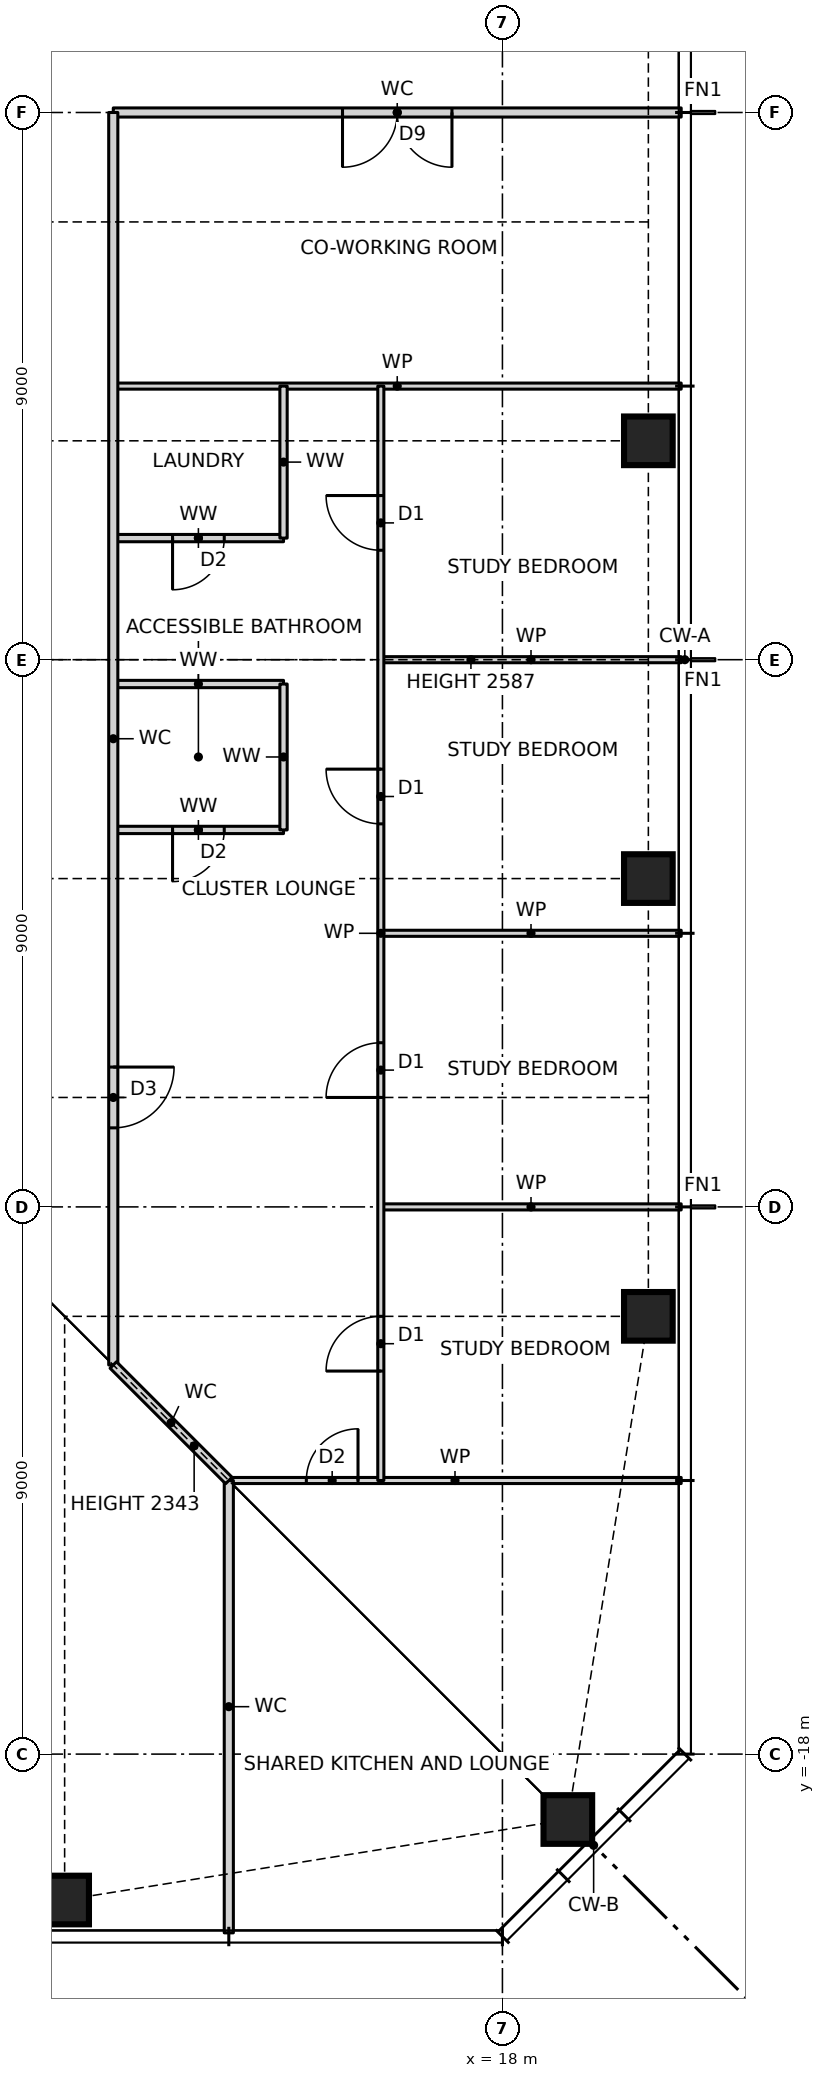
"""IFC4 building model, lengths in metres.
Left out: names, types, materials, properties, quantities, classifications, styles, units other than length and angle.
Written with IfcOpenShell. Run it as: python <this file> out.ifc"""

import sys

from ifc_helpers import new_model, si_unit, direction, frame, frame_2d, origin, origin_2d, place, context, subcontext, project, spatial, rectangle, hollow_rectangle, extrude, element, fill, save


model = new_model("IFC4")
c1 = context("Model", 3, precision=1e-05, world=origin(), true_north=direction((0.0, 1.0)))
c2 = subcontext(c1, "Body", "Model", "MODEL_VIEW")
j1 = project(units=[si_unit("LENGTHUNIT", "METRE"), si_unit("PLANEANGLEUNIT", "RADIAN")], contexts=[c1])
p1 = place(None, origin())
s1 = spatial("IfcSite", under=j1, at=p1, CompositionType="ELEMENT")
p2 = place(p1, origin())
s2 = spatial("IfcBuilding", under=s1, at=p2, CompositionType="ELEMENT")
p3 = place(p2, frame((0.0, 0.0, 119.0)))
s3 = spatial("IfcBuildingStorey", under=s2, at=p3, CompositionType="ELEMENT", Elevation=119.0)
for number, where, z_axis, x_axis in (
    (1, (10.8, -20.4, 0.0), (0.0, 0.0, 1.0), (1.0, 0.0, 0.0)),
    (2, (19.076, -19.076, 0.0), (0.0, 0.0, 1.0), (1.0, 0.0, 0.0)),
    (3, (20.4, -10.8, 0.0), (0.0, 0.0, 1.0), (1.0, 0.0, 0.0)),
    (4, (20.4, -3.6, 0.0), (0.0, 0.0, 1.0), (1.0, 0.0, 0.0)),
    (5, (20.4, 3.6, 0.0), (0.0, 0.0, 1.0), (1.0, 0.0, 0.0)),
):
    element("IfcColumn", number, at=place(p3, frame(where, z_axis=z_axis, x_axis=x_axis)), inside=s3, PredefinedType="COLUMN", context=c2, shape_type="SweptSolid", body=[
        extrude(hollow_rectangle(XDim=0.8, YDim=0.8, WallThickness=0.07, at=origin_2d()), origin(), (0.0, 0.0, 1.0), 3.5),
    ])
p4 = place(p3, frame((13.5, -13.5, 0.0), z_axis=(0.0, 0.0, 1.0), x_axis=(1.0, 0.0, 0.0)))
e6 = element("IfcWall", 6, at=p4, inside=s3, PredefinedType="PARTITIONING", context=c2, shape_type="SweptSolid", body=[
    extrude(rectangle(XDim=7.44, YDim=0.1, at=frame_2d((3.72, 0.0))), origin(), (0.0, 0.0, 1.0), 3.27),
])
p5 = place(p4, frame((1.275, 0.0, 0.0)))
e7 = element("IfcOpeningElement", 7, at=p5, cuts=e6, PredefinedType="OPENING", context=c2, shape_type="SweptSolid", body=[
    extrude(rectangle(XDim=0.85, YDim=2.1, at=frame_2d((0.425, 1.05))), frame((0.0, 0.06, 0.0), z_axis=(0.0, -1.0, 0.0), x_axis=(1.0, 0.0, 0.0)), (0.0, 0.0, 1.0), 0.12),
])
for number, where, z_axis, x_axis in (
    (8, (16.0, -9.0, 0.0), (0.0, 0.0, 1.0), (1.0, 0.0, 0.0)),
    (9, (16.0, -4.5, 0.0), (0.0, 0.0, 1.0), (1.0, 0.0, 0.0)),
):
    element("IfcWall", number, at=place(p3, frame(where, z_axis=z_axis, x_axis=x_axis)), inside=s3, PredefinedType="PARTITIONING", context=c2, shape_type="SweptSolid", body=[
        extrude(rectangle(XDim=4.94, YDim=0.1, at=frame_2d((2.47, 0.0))), origin(), (0.0, 0.0, 1.0), 3.27),
    ])
p6 = place(p3, frame((11.6, -2.8, 0.0), z_axis=(0.0, 0.0, 1.0), x_axis=(1.0, 0.0, 0.0)))
e10 = element("IfcWall", 10, at=p6, inside=s3, PredefinedType="PARTITIONING", context=c2, shape_type="SweptSolid", body=[
    extrude(rectangle(XDim=2.8, YDim=0.12, at=frame_2d((1.4, 0.0))), origin(), (0.0, 0.0, 1.0), 3.27),
])
p7 = place(p6, frame((0.975, 0.0, 0.0)))
e11 = element("IfcOpeningElement", 11, at=p7, cuts=e10, PredefinedType="OPENING", context=c2, shape_type="SweptSolid", body=[
    extrude(rectangle(XDim=0.85, YDim=2.1, at=frame_2d((0.425, 1.05))), frame((0.0, 0.07, 0.0), z_axis=(0.0, -1.0, 0.0), x_axis=(1.0, 0.0, 0.0)), (0.0, 0.0, 1.0), 0.14),
])
p8 = place(p3, frame((11.6, -0.4, 0.0), z_axis=(0.0, 0.0, 1.0), x_axis=(1.0, 0.0, 0.0)))
e12 = element("IfcWall", 12, at=p8, inside=s3, PredefinedType="PARTITIONING", context=c2, shape_type="SweptSolid", body=[
    extrude(rectangle(XDim=2.8, YDim=0.12, at=frame_2d((1.4, 0.0))), origin(), (0.0, 0.0, 1.0), 3.27),
])
p9 = place(p3, frame((16.0, 0.0, 0.0), z_axis=(0.0, 0.0, 1.0), x_axis=(1.0, 0.0, 0.0)))
e13 = element("IfcWall", 13, at=p9, inside=s3, PredefinedType="PARTITIONING", context=c2, shape_type="SweptSolid", body=[
    extrude(rectangle(XDim=4.94, YDim=0.1, at=frame_2d((2.47, 0.0))), origin(), (0.0, 0.0, 1.0), 2.587),
])
p10 = place(p3, frame((11.6, 2.0, 0.0), z_axis=(0.0, 0.0, 1.0), x_axis=(1.0, 0.0, 0.0)))
e14 = element("IfcWall", 14, at=p10, inside=s3, PredefinedType="PARTITIONING", context=c2, shape_type="SweptSolid", body=[
    extrude(rectangle(XDim=2.8, YDim=0.12, at=frame_2d((1.4, 0.0))), origin(), (0.0, 0.0, 1.0), 3.27),
])
p11 = place(p10, frame((0.975, 0.0, 0.0)))
e15 = element("IfcOpeningElement", 15, at=p11, cuts=e14, PredefinedType="OPENING", context=c2, shape_type="SweptSolid", body=[
    extrude(rectangle(XDim=0.85, YDim=2.1, at=frame_2d((0.425, 1.05))), frame((0.0, 0.07, 0.0), z_axis=(0.0, -1.0, 0.0), x_axis=(1.0, 0.0, 0.0)), (0.0, 0.0, 1.0), 0.14),
])
p12 = place(p3, frame((11.6, 4.5, 0.0), z_axis=(0.0, 0.0, 1.0), x_axis=(1.0, 0.0, 0.0)))
e16 = element("IfcWall", 16, at=p12, inside=s3, PredefinedType="PARTITIONING", context=c2, shape_type="SweptSolid", body=[
    extrude(rectangle(XDim=9.34, YDim=0.1, at=frame_2d((4.67, 0.0))), origin(), (0.0, 0.0, 1.0), 3.27),
])
p13 = place(p3, frame((11.6, 9.0, 0.0), z_axis=(0.0, 0.0, 1.0), x_axis=(1.0, 0.0, 0.0)))
e17 = element("IfcWall", 17, at=p13, inside=s3, PredefinedType="PARTITIONING", context=c2, shape_type="SweptSolid", body=[
    extrude(rectangle(XDim=9.34, YDim=0.15, at=frame_2d((4.67, 0.0))), origin(), (0.0, 0.0, 1.0), 3.27),
])
p14 = place(p13, frame((3.77, 0.0, 0.0)))
e18 = element("IfcOpeningElement", 18, at=p14, cuts=e17, PredefinedType="OPENING", context=c2, shape_type="SweptSolid", body=[
    extrude(rectangle(XDim=1.8, YDim=2.1, at=frame_2d((0.9, 1.05))), frame((0.0, 0.085, 0.0), z_axis=(0.0, -1.0, 0.0), x_axis=(1.0, 0.0, 0.0)), (0.0, 0.0, 1.0), 0.17),
])
p15 = place(p3, frame((16.0, -13.5, 0.0), z_axis=(0.0, 0.0, 1.0), x_axis=(0.0, 1.0, 0.0)))
e19 = element("IfcWall", 19, at=p15, inside=s3, PredefinedType="PARTITIONING", context=c2, shape_type="SweptSolid", body=[
    extrude(rectangle(XDim=18.0, YDim=0.1, at=frame_2d((9.0, 0.0))), origin(), (0.0, 0.0, 1.0), 3.27),
])
p16 = place(p15, frame((1.8, 0.0, 0.0)))
e20 = element("IfcOpeningElement", 20, at=p16, cuts=e19, PredefinedType="OPENING", context=c2, shape_type="SweptSolid", body=[
    extrude(rectangle(XDim=0.9, YDim=2.1, at=frame_2d((0.45, 1.05))), frame((0.0, 0.06, 0.0), z_axis=(0.0, -1.0, 0.0), x_axis=(1.0, 0.0, 0.0)), (0.0, 0.0, 1.0), 0.12),
])
p17 = place(p15, frame((6.3, 0.0, 0.0)))
e21 = element("IfcOpeningElement", 21, at=p17, cuts=e19, PredefinedType="OPENING", context=c2, shape_type="SweptSolid", body=[
    extrude(rectangle(XDim=0.9, YDim=2.1, at=frame_2d((0.45, 1.05))), frame((0.0, 0.06, 0.0), z_axis=(0.0, -1.0, 0.0), x_axis=(1.0, 0.0, 0.0)), (0.0, 0.0, 1.0), 0.12),
])
p18 = place(p15, frame((10.8, 0.0, 0.0)))
e22 = element("IfcOpeningElement", 22, at=p18, cuts=e19, PredefinedType="OPENING", context=c2, shape_type="SweptSolid", body=[
    extrude(rectangle(XDim=0.9, YDim=2.1, at=frame_2d((0.45, 1.05))), frame((0.0, 0.06, 0.0), z_axis=(0.0, -1.0, 0.0), x_axis=(1.0, 0.0, 0.0)), (0.0, 0.0, 1.0), 0.12),
])
p19 = place(p15, frame((15.3, 0.0, 0.0)))
e23 = element("IfcOpeningElement", 23, at=p19, cuts=e19, PredefinedType="OPENING", context=c2, shape_type="SweptSolid", body=[
    extrude(rectangle(XDim=0.9, YDim=2.1, at=frame_2d((0.45, 1.05))), frame((0.0, 0.06, 0.0), z_axis=(0.0, -1.0, 0.0), x_axis=(1.0, 0.0, 0.0)), (0.0, 0.0, 1.0), 0.12),
])
p20 = place(p3, frame((14.4, -2.8, 0.0), z_axis=(0.0, 0.0, 1.0), x_axis=(0.0, 1.0, 0.0)))
e24 = element("IfcWall", 24, at=p20, inside=s3, PredefinedType="PARTITIONING", context=c2, shape_type="SweptSolid", body=[
    extrude(rectangle(XDim=2.4, YDim=0.12, at=frame_2d((1.2, 0.0))), origin(), (0.0, 0.0, 1.0), 3.27),
])
p21 = place(p3, frame((14.4, 2.0, 0.0), z_axis=(0.0, 0.0, 1.0), x_axis=(0.0, 1.0, 0.0)))
e25 = element("IfcWall", 25, at=p21, inside=s3, PredefinedType="PARTITIONING", context=c2, shape_type="SweptSolid", body=[
    extrude(rectangle(XDim=2.5, YDim=0.12, at=frame_2d((1.25, 0.0))), origin(), (0.0, 0.0, 1.0), 3.27),
])
p22 = place(p3, frame((13.5, -20.94, 0.0), z_axis=(0.0, 0.0, 1.0), x_axis=(0.0, 1.0, 0.0)))
e26 = element("IfcWall", 26, at=p22, inside=s3, PredefinedType="PARTITIONING", context=c2, shape_type="SweptSolid", body=[
    extrude(rectangle(XDim=7.44, YDim=0.15, at=frame_2d((3.72, 0.0))), origin(), (0.0, 0.0, 1.0), 3.27),
])
p23 = place(p3, frame((11.6, -11.6, 0.0), z_axis=(0.0, 0.0, 1.0), x_axis=(0.0, 1.0, 0.0)))
e27 = element("IfcWall", 27, at=p23, inside=s3, PredefinedType="PARTITIONING", context=c2, shape_type="SweptSolid", body=[
    extrude(rectangle(XDim=20.6, YDim=0.15, at=frame_2d((10.3, 0.0))), origin(), (0.0, 0.0, 1.0), 3.27),
])
p24 = place(p23, frame((3.9, 0.0, 0.0)))
e28 = element("IfcOpeningElement", 28, at=p24, cuts=e27, PredefinedType="OPENING", context=c2, shape_type="SweptSolid", body=[
    extrude(rectangle(XDim=1.0, YDim=2.1, at=frame_2d((0.5, 1.05))), frame((0.0, 0.085, 0.0), z_axis=(0.0, -1.0, 0.0), x_axis=(1.0, 0.0, 0.0)), (0.0, 0.0, 1.0), 0.17),
])
p25 = place(p3, frame((13.5, -13.5, 0.0), z_axis=(0.0, 0.0, 1.0), x_axis=(-0.707106781187, 0.707106781187, 0.0)))
e29 = element("IfcWall", 29, at=p25, inside=s3, PredefinedType="PARTITIONING", context=c2, shape_type="SweptSolid", body=[
    extrude(rectangle(XDim=2.687, YDim=0.15, at=frame_2d((1.343, 0.0))), origin(), (0.0, 0.0, 1.0), 2.343),
])
p26 = place(p16, origin())
e30 = element("IfcDoor", 30, at=p26, inside=s3, OperationType="SINGLE_SWING_LEFT", PredefinedType="DOOR", context=c2, shape_type="SweptSolid", body=[
    extrude(rectangle(XDim=0.9, YDim=2.1, at=frame_2d((0.45, 1.05))), frame((0.0, 0.025, 0.0), z_axis=(0.0, -1.0, 0.0), x_axis=(1.0, 0.0, 0.0)), (0.0, 0.0, 1.0), 0.05),
])
fill(e20, e30)
p27 = place(p17, origin())
e31 = element("IfcDoor", 31, at=p27, inside=s3, OperationType="SINGLE_SWING_LEFT", PredefinedType="DOOR", context=c2, shape_type="SweptSolid", body=[
    extrude(rectangle(XDim=0.9, YDim=2.1, at=frame_2d((0.45, 1.05))), frame((0.0, 0.025, 0.0), z_axis=(0.0, -1.0, 0.0), x_axis=(1.0, 0.0, 0.0)), (0.0, 0.0, 1.0), 0.05),
])
fill(e21, e31)
p28 = place(p18, origin())
e32 = element("IfcDoor", 32, at=p28, inside=s3, OperationType="SINGLE_SWING_RIGHT", PredefinedType="DOOR", context=c2, shape_type="SweptSolid", body=[
    extrude(rectangle(XDim=0.9, YDim=2.1, at=frame_2d((0.45, 1.05))), frame((0.0, 0.025, 0.0), z_axis=(0.0, -1.0, 0.0), x_axis=(1.0, 0.0, 0.0)), (0.0, 0.0, 1.0), 0.05),
])
fill(e22, e32)
p29 = place(p19, origin())
e33 = element("IfcDoor", 33, at=p29, inside=s3, OperationType="SINGLE_SWING_RIGHT", PredefinedType="DOOR", context=c2, shape_type="SweptSolid", body=[
    extrude(rectangle(XDim=0.9, YDim=2.1, at=frame_2d((0.45, 1.05))), frame((0.0, 0.025, 0.0), z_axis=(0.0, -1.0, 0.0), x_axis=(1.0, 0.0, 0.0)), (0.0, 0.0, 1.0), 0.05),
])
fill(e23, e33)
p30 = place(p24, frame((1.0, 0.0, 0.0), z_axis=(0.0, 0.0, 1.0), x_axis=(-1.0, 0.0, 0.0)))
e34 = element("IfcDoor", 34, at=p30, inside=s3, OperationType="SINGLE_SWING_LEFT", PredefinedType="DOOR", context=c2, shape_type="SweptSolid", body=[
    extrude(rectangle(XDim=1.0, YDim=2.1, at=frame_2d((0.5, 1.05))), frame((0.0, 0.025, 0.0), z_axis=(0.0, -1.0, 0.0), x_axis=(1.0, 0.0, 0.0)), (0.0, 0.0, 1.0), 0.05),
])
fill(e28, e34)
p31 = place(p7, frame((0.85, 0.0, 0.0), z_axis=(0.0, 0.0, 1.0), x_axis=(-1.0, 0.0, 0.0)))
e35 = element("IfcDoor", 35, at=p31, inside=s3, OperationType="SINGLE_SWING_RIGHT", PredefinedType="DOOR", context=c2, shape_type="SweptSolid", body=[
    extrude(rectangle(XDim=0.85, YDim=2.1, at=frame_2d((0.425, 1.05))), frame((0.0, 0.025, 0.0), z_axis=(0.0, -1.0, 0.0), x_axis=(1.0, 0.0, 0.0)), (0.0, 0.0, 1.0), 0.05),
])
fill(e11, e35)
p32 = place(p11, frame((0.85, 0.0, 0.0), z_axis=(0.0, 0.0, 1.0), x_axis=(-1.0, 0.0, 0.0)))
e36 = element("IfcDoor", 36, at=p32, inside=s3, OperationType="SINGLE_SWING_RIGHT", PredefinedType="DOOR", context=c2, shape_type="SweptSolid", body=[
    extrude(rectangle(XDim=0.85, YDim=2.1, at=frame_2d((0.425, 1.05))), frame((0.0, 0.025, 0.0), z_axis=(0.0, -1.0, 0.0), x_axis=(1.0, 0.0, 0.0)), (0.0, 0.0, 1.0), 0.05),
])
fill(e15, e36)
p33 = place(p14, frame((1.8, 0.0, 0.0), z_axis=(0.0, 0.0, 1.0), x_axis=(-1.0, 0.0, 0.0)))
e37 = element("IfcDoor", 37, at=p33, inside=s3, OperationType="DOUBLE_DOOR_SINGLE_SWING", PredefinedType="DOOR", context=c2, shape_type="SweptSolid", body=[
    extrude(rectangle(XDim=1.8, YDim=2.1, at=frame_2d((0.9, 1.05))), frame((0.0, 0.025, 0.0), z_axis=(0.0, -1.0, 0.0), x_axis=(1.0, 0.0, 0.0)), (0.0, 0.0, 1.0), 0.05),
])
fill(e18, e37)
p34 = place(p5, origin())
e38 = element("IfcDoor", 38, at=p34, inside=s3, OperationType="SINGLE_SWING_RIGHT", PredefinedType="DOOR", context=c2, shape_type="SweptSolid", body=[
    extrude(rectangle(XDim=0.85, YDim=2.1, at=frame_2d((0.425, 1.05))), frame((0.0, 0.025, 0.0), z_axis=(0.0, -1.0, 0.0), x_axis=(1.0, 0.0, 0.0)), (0.0, 0.0, 1.0), 0.05),
])
fill(e7, e38)
save(model, sys.argv[1])
